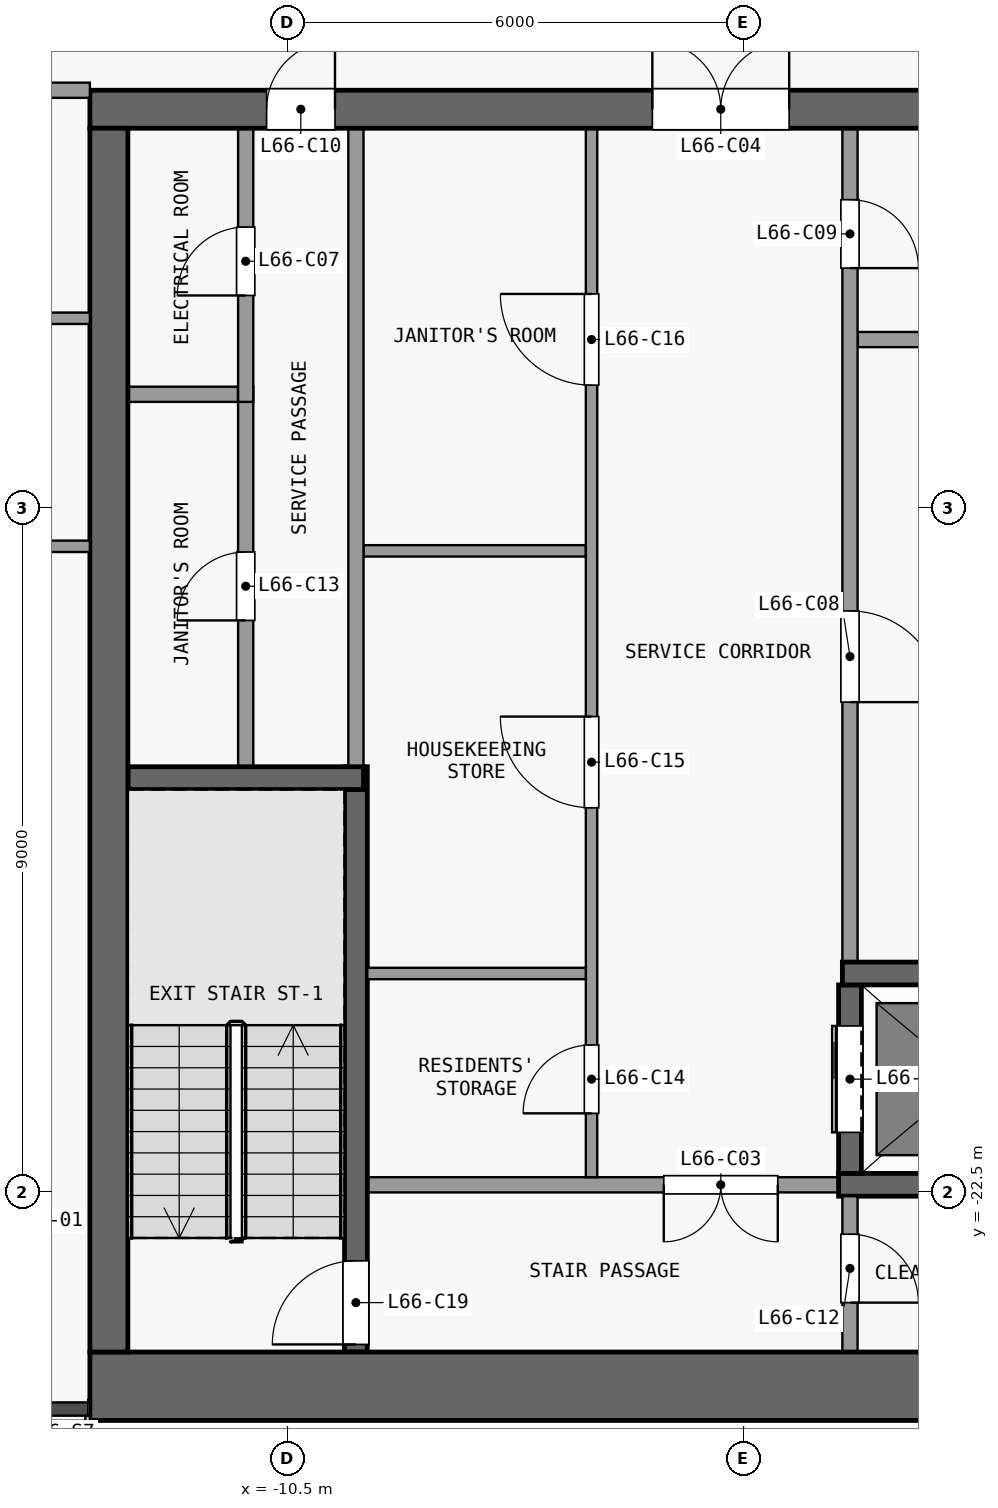
"""IFC4 building model, lengths in metres.
Left out: names, types, materials, properties, quantities, classifications, styles, units other than length and angle.
Written with IfcOpenShell. Run it as: python <this file> out.ifc"""

import sys

from ifc_helpers import new_model, si_unit, direction, frame, frame_2d, origin, place, context, subcontext, project, spatial, rectangle, extrude, element, fill, save


model = new_model("IFC4")
c1 = context("Model", 3, precision=1e-05, world=origin(), true_north=direction((0.0, 1.0)))
c2 = subcontext(c1, "Body", "Model", "MODEL_VIEW")
j1 = project(units=[si_unit("LENGTHUNIT", "METRE"), si_unit("PLANEANGLEUNIT", "RADIAN")], contexts=[c1])
p1 = place(None, origin())
s1 = spatial("IfcSite", under=j1, at=p1, CompositionType="ELEMENT")
p2 = place(p1, origin())
s2 = spatial("IfcBuilding", under=s1, at=p2, CompositionType="ELEMENT")
p3 = place(p2, frame((0.0, 0.0, 262.7)))
s3 = spatial("IfcBuildingStorey", under=s2, at=p3, CompositionType="ELEMENT", Elevation=262.7)
p4 = place(p3, frame((-13.1, -25.05, 0.0), z_axis=(0.0, 0.0, 1.0), x_axis=(1.0, 0.0, 0.0)))
e1 = element("IfcWall", 1, at=p4, inside=s3, PredefinedType="SHEAR", context=c2, shape_type="SweptSolid", body=[
    extrude(rectangle(XDim=26.2, YDim=0.9, at=frame_2d((13.1, 0.0))), origin(), (0.0, 0.0, 1.0), 3.3),
])
p5 = place(p3, frame((-13.1, -8.25, 0.0), z_axis=(0.0, 0.0, 1.0), x_axis=(1.0, 0.0, 0.0)))
e2 = element("IfcWall", 2, at=p5, inside=s3, PredefinedType="SHEAR", context=c2, shape_type="SweptSolid", body=[
    extrude(rectangle(XDim=26.2, YDim=0.5, at=frame_2d((13.1, 0.0))), origin(), (0.0, 0.0, 1.0), 3.3),
])
p6 = place(p5, frame((7.4, 0.0, 0.0)))
e3 = element("IfcOpeningElement", 3, at=p6, cuts=e2, PredefinedType="OPENING", context=c2, shape_type="SweptSolid", body=[
    extrude(rectangle(XDim=1.8, YDim=2.1, at=frame_2d((0.9, 1.05))), frame((0.0, 0.26, 0.0), z_axis=(0.0, -1.0, 0.0), x_axis=(1.0, 0.0, 0.0)), (0.0, 0.0, 1.0), 0.52),
])
p7 = place(p5, frame((17.0, 0.0, 0.0)))
e4 = element("IfcOpeningElement", 4, at=p7, cuts=e2, PredefinedType="OPENING", context=c2, shape_type="SweptSolid", body=[
    extrude(rectangle(XDim=1.8, YDim=2.1, at=frame_2d((0.9, 1.05))), frame((0.0, 0.26, 0.0), z_axis=(0.0, -1.0, 0.0), x_axis=(1.0, 0.0, 0.0)), (0.0, 0.0, 1.0), 0.52),
])
p8 = place(p5, frame((2.325, 0.0, 0.0)))
e5 = element("IfcOpeningElement", 5, at=p8, cuts=e2, PredefinedType="OPENING", context=c2, shape_type="SweptSolid", body=[
    extrude(rectangle(XDim=0.9, YDim=2.1, at=frame_2d((0.45, 1.05))), frame((0.0, 0.26, 0.0), z_axis=(0.0, -1.0, 0.0), x_axis=(1.0, 0.0, 0.0)), (0.0, 0.0, 1.0), 0.52),
])
p9 = place(p5, frame((23.675, 0.0, 0.0)))
e6 = element("IfcOpeningElement", 6, at=p9, cuts=e2, PredefinedType="OPENING", context=c2, shape_type="SweptSolid", body=[
    extrude(rectangle(XDim=1.2, YDim=2.1, at=frame_2d((0.6, 1.05))), frame((0.0, 0.26, 0.0), z_axis=(0.0, -1.0, 0.0), x_axis=(1.0, 0.0, 0.0)), (0.0, 0.0, 1.0), 0.52),
])
p10 = place(p3, frame((-12.85, -24.6, 0.0), z_axis=(0.0, 0.0, 1.0), x_axis=(0.0, 1.0, 0.0)))
e7 = element("IfcWall", 7, at=p10, inside=s3, PredefinedType="SHEAR", context=c2, shape_type="SweptSolid", body=[
    extrude(rectangle(XDim=16.1, YDim=0.5, at=frame_2d((8.05, 0.0))), origin(), (0.0, 0.0, 1.0), 3.3),
])
p11 = place(p3, frame((-3.25, -22.4, 0.0), z_axis=(0.0, 0.0, 1.0), x_axis=(-1.0, 0.0, 0.0)))
e8 = element("IfcWall", 8, at=p11, inside=s3, PredefinedType="PARTITIONING", context=c2, shape_type="SweptSolid", body=[
    extrude(rectangle(XDim=6.2, YDim=0.2, at=frame_2d((3.1, 0.0))), origin(), (0.0, 0.0, 1.0), 3.3),
])
p12 = place(p11, frame((0.8, 0.0, 0.0)))
e9 = element("IfcOpeningElement", 9, at=p12, cuts=e8, PredefinedType="OPENING", context=c2, shape_type="SweptSolid", body=[
    extrude(rectangle(XDim=1.5, YDim=2.1, at=frame_2d((0.75, 1.05))), frame((0.0, 0.11, 0.0), z_axis=(0.0, -1.0, 0.0), x_axis=(1.0, 0.0, 0.0)), (0.0, 0.0, 1.0), 0.22),
])
p13 = place(p3, frame((-3.25, -22.4, 0.0), z_axis=(0.0, 0.0, 1.0), x_axis=(1.0, 0.0, 0.0)))
e10 = element("IfcWall", 10, at=p13, inside=s3, PredefinedType="SHEAR", context=c2, shape_type="SweptSolid", body=[
    extrude(rectangle(XDim=6.5, YDim=0.3, at=frame_2d((3.25, 0.0))), origin(), (0.0, 0.0, 1.0), 3.3),
])
p14 = place(p3, frame((-9.45, -19.62, 0.0), z_axis=(0.0, 0.0, 1.0), x_axis=(1.0, 0.0, 0.0)))
e11 = element("IfcWall", 11, at=p14, inside=s3, PredefinedType="PARTITIONING", context=c2, shape_type="SweptSolid", body=[
    extrude(rectangle(XDim=2.875, YDim=0.15, at=frame_2d((1.438, 0.0))), origin(), (0.0, 0.0, 1.0), 3.3),
])
p15 = place(p3, frame((-3.2, -19.62, 0.0), z_axis=(0.0, 0.0, 1.0), x_axis=(1.0, 0.0, 0.0)))
e12 = element("IfcWall", 12, at=p15, inside=s3, PredefinedType="SHEAR", context=c2, shape_type="SweptSolid", body=[
    extrude(rectangle(XDim=3.05, YDim=0.3, at=frame_2d((1.525, 0.0))), origin(), (0.0, 0.0, 1.0), 3.3),
])
p16 = place(p3, frame((-12.6, -17.05, 0.0), z_axis=(0.0, 0.0, 1.0), x_axis=(1.0, 0.0, 0.0)))
e13 = element("IfcWall", 13, at=p16, inside=s3, PredefinedType="SHEAR", context=c2, shape_type="SweptSolid", body=[
    extrude(rectangle(XDim=3.1, YDim=0.3, at=frame_2d((1.55, 0.0))), origin(), (0.0, 0.0, 1.0), 3.3),
])
p17 = place(p3, frame((-9.5, -14.06, 0.0), z_axis=(0.0, 0.0, 1.0), x_axis=(1.0, 0.0, 0.0)))
e14 = element("IfcWall", 14, at=p17, inside=s3, PredefinedType="PARTITIONING", context=c2, shape_type="SweptSolid", body=[
    extrude(rectangle(XDim=2.925, YDim=0.15, at=frame_2d((1.462, 0.0))), origin(), (0.0, 0.0, 1.0), 3.3),
])
p18 = place(p3, frame((-12.6, -12.0, 0.0), z_axis=(0.0, 0.0, 1.0), x_axis=(1.0, 0.0, 0.0)))
e15 = element("IfcWall", 15, at=p18, inside=s3, PredefinedType="PARTITIONING", context=c2, shape_type="SweptSolid", body=[
    extrude(rectangle(XDim=1.45, YDim=0.2, at=frame_2d((0.725, 0.0))), origin(), (0.0, 0.0, 1.0), 3.3),
])
p19 = place(p3, frame((-3.0, -11.28, 0.0), z_axis=(0.0, 0.0, 1.0), x_axis=(1.0, 0.0, 0.0)))
e16 = element("IfcWall", 16, at=p19, inside=s3, PredefinedType="PARTITIONING", context=c2, shape_type="SweptSolid", body=[
    extrude(rectangle(XDim=2.9, YDim=0.2, at=frame_2d((1.45, 0.0))), origin(), (0.0, 0.0, 1.0), 3.3),
])
p20 = place(p3, frame((-11.05, -16.9, 0.0), z_axis=(0.0, 0.0, 1.0), x_axis=(0.0, 1.0, 0.0)))
e17 = element("IfcWall", 17, at=p20, inside=s3, PredefinedType="PARTITIONING", context=c2, shape_type="SweptSolid", body=[
    extrude(rectangle(XDim=5.0, YDim=0.2, at=frame_2d((2.5, 0.0))), origin(), (0.0, 0.0, 1.0), 3.3),
])
p21 = place(p20, frame((1.925, 0.0, 0.0)))
e18 = element("IfcOpeningElement", 18, at=p21, cuts=e17, PredefinedType="OPENING", context=c2, shape_type="SweptSolid", body=[
    extrude(rectangle(XDim=0.9, YDim=2.1, at=frame_2d((0.45, 1.05))), frame((0.0, 0.11, 0.0), z_axis=(0.0, -1.0, 0.0), x_axis=(1.0, 0.0, 0.0)), (0.0, 0.0, 1.0), 0.22),
])
p22 = place(p3, frame((-11.05, -12.1, 0.0), z_axis=(0.0, 0.0, 1.0), x_axis=(0.0, 1.0, 0.0)))
e19 = element("IfcWall", 19, at=p22, inside=s3, PredefinedType="PARTITIONING", context=c2, shape_type="SweptSolid", body=[
    extrude(rectangle(XDim=3.6, YDim=0.2, at=frame_2d((1.8, 0.0))), origin(), (0.0, 0.0, 1.0), 3.3),
])
p23 = place(p22, frame((1.4, 0.0, 0.0)))
e20 = element("IfcOpeningElement", 20, at=p23, cuts=e19, PredefinedType="OPENING", context=c2, shape_type="SweptSolid", body=[
    extrude(rectangle(XDim=0.9, YDim=2.1, at=frame_2d((0.45, 1.05))), frame((0.0, 0.11, 0.0), z_axis=(0.0, -1.0, 0.0), x_axis=(1.0, 0.0, 0.0)), (0.0, 0.0, 1.0), 0.22),
])
p24 = place(p3, frame((-9.6, -24.6, 0.0), z_axis=(0.0, 0.0, 1.0), x_axis=(0.0, 1.0, 0.0)))
e21 = element("IfcWall", 21, at=p24, inside=s3, PredefinedType="SHEAR", context=c2, shape_type="SweptSolid", body=[
    extrude(rectangle(XDim=7.7, YDim=0.3, at=frame_2d((3.85, 0.0))), origin(), (0.0, 0.0, 1.0), 3.3),
])
p25 = place(p24, frame((0.1, 0.0, 0.0)))
e22 = element("IfcOpeningElement", 22, at=p25, cuts=e21, PredefinedType="OPENING", context=c2, shape_type="SweptSolid", body=[
    extrude(rectangle(XDim=1.1, YDim=2.1, at=frame_2d((0.55, 1.05))), frame((0.0, 0.16, 0.0), z_axis=(0.0, -1.0, 0.0), x_axis=(1.0, 0.0, 0.0)), (0.0, 0.0, 1.0), 0.32),
])
p26 = place(p3, frame((-9.6, -16.9, 0.0), z_axis=(0.0, 0.0, 1.0), x_axis=(0.0, 1.0, 0.0)))
e23 = element("IfcWall", 23, at=p26, inside=s3, PredefinedType="PARTITIONING", context=c2, shape_type="SweptSolid", body=[
    extrude(rectangle(XDim=8.4, YDim=0.2, at=frame_2d((4.2, 0.0))), origin(), (0.0, 0.0, 1.0), 3.3),
])
p27 = place(p3, frame((-6.5, -22.3, 0.0), z_axis=(0.0, 0.0, 1.0), x_axis=(0.0, 1.0, 0.0)))
e24 = element("IfcWall", 24, at=p27, inside=s3, PredefinedType="PARTITIONING", context=c2, shape_type="SweptSolid", body=[
    extrude(rectangle(XDim=13.8, YDim=0.15, at=frame_2d((6.9, 0.0))), origin(), (0.0, 0.0, 1.0), 3.3),
])
p28 = place(p27, frame((0.84, 0.0, 0.0)))
e25 = element("IfcOpeningElement", 25, at=p28, cuts=e24, PredefinedType="OPENING", context=c2, shape_type="SweptSolid", body=[
    extrude(rectangle(XDim=0.9, YDim=2.1, at=frame_2d((0.45, 1.05))), frame((0.0, 0.085, 0.0), z_axis=(0.0, -1.0, 0.0), x_axis=(1.0, 0.0, 0.0)), (0.0, 0.0, 1.0), 0.17),
])
p29 = place(p27, frame((4.86, 0.0, 0.0)))
e26 = element("IfcOpeningElement", 26, at=p29, cuts=e24, PredefinedType="OPENING", context=c2, shape_type="SweptSolid", body=[
    extrude(rectangle(XDim=1.2, YDim=2.1, at=frame_2d((0.6, 1.05))), frame((0.0, 0.085, 0.0), z_axis=(0.0, -1.0, 0.0), x_axis=(1.0, 0.0, 0.0)), (0.0, 0.0, 1.0), 0.17),
])
p30 = place(p27, frame((10.42, 0.0, 0.0)))
e27 = element("IfcOpeningElement", 27, at=p30, cuts=e24, PredefinedType="OPENING", context=c2, shape_type="SweptSolid", body=[
    extrude(rectangle(XDim=1.2, YDim=2.1, at=frame_2d((0.6, 1.05))), frame((0.0, 0.085, 0.0), z_axis=(0.0, -1.0, 0.0), x_axis=(1.0, 0.0, 0.0)), (0.0, 0.0, 1.0), 0.17),
])
p31 = place(p3, frame((-3.1, -22.55, 0.0), z_axis=(0.0, 0.0, 1.0), x_axis=(0.0, -1.0, 0.0)))
e28 = element("IfcWall", 28, at=p31, inside=s3, PredefinedType="PARTITIONING", context=c2, shape_type="SweptSolid", body=[
    extrude(rectangle(XDim=2.05, YDim=0.2, at=frame_2d((1.025, 0.0))), origin(), (0.0, 0.0, 1.0), 3.3),
])
p32 = place(p31, frame((0.5, 0.0, 0.0)))
e29 = element("IfcOpeningElement", 29, at=p32, cuts=e28, PredefinedType="OPENING", context=c2, shape_type="SweptSolid", body=[
    extrude(rectangle(XDim=0.9, YDim=2.1, at=frame_2d((0.45, 1.05))), frame((0.0, 0.11, 0.0), z_axis=(0.0, -1.0, 0.0), x_axis=(1.0, 0.0, 0.0)), (0.0, 0.0, 1.0), 0.22),
])
p33 = place(p3, frame((-3.1, -22.25, 0.0), z_axis=(0.0, 0.0, 1.0), x_axis=(0.0, 1.0, 0.0)))
e30 = element("IfcWall", 30, at=p33, inside=s3, PredefinedType="SHEAR", context=c2, shape_type="SweptSolid", body=[
    extrude(rectangle(XDim=2.48, YDim=0.3, at=frame_2d((1.24, 0.0))), origin(), (0.0, 0.0, 1.0), 3.3),
])
p34 = place(p33, frame((0.54, 0.0, 0.0)))
e31 = element("IfcOpeningElement", 31, at=p34, cuts=e30, PredefinedType="OPENING", context=c2, shape_type="SweptSolid", body=[
    extrude(rectangle(XDim=1.4, YDim=2.1, at=frame_2d((0.7, 1.05))), frame((0.0, 0.16, 0.0), z_axis=(0.0, -1.0, 0.0), x_axis=(1.0, 0.0, 0.0)), (0.0, 0.0, 1.0), 0.32),
])
p35 = place(p3, frame((-3.1, -8.5, 0.0), z_axis=(0.0, 0.0, 1.0), x_axis=(0.0, -1.0, 0.0)))
e32 = element("IfcWall", 32, at=p35, inside=s3, PredefinedType="PARTITIONING", context=c2, shape_type="SweptSolid", body=[
    extrude(rectangle(XDim=10.97, YDim=0.2, at=frame_2d((5.485, 0.0))), origin(), (0.0, 0.0, 1.0), 3.3),
])
p36 = place(p35, frame((6.35, 0.0, 0.0)))
e33 = element("IfcOpeningElement", 33, at=p36, cuts=e32, PredefinedType="OPENING", context=c2, shape_type="SweptSolid", body=[
    extrude(rectangle(XDim=1.2, YDim=2.1, at=frame_2d((0.6, 1.05))), frame((0.0, 0.11, 0.0), z_axis=(0.0, -1.0, 0.0), x_axis=(1.0, 0.0, 0.0)), (0.0, 0.0, 1.0), 0.22),
])
p37 = place(p35, frame((0.94, 0.0, 0.0)))
e34 = element("IfcOpeningElement", 34, at=p37, cuts=e32, PredefinedType="OPENING", context=c2, shape_type="SweptSolid", body=[
    extrude(rectangle(XDim=0.9, YDim=2.1, at=frame_2d((0.45, 1.05))), frame((0.0, 0.11, 0.0), z_axis=(0.0, -1.0, 0.0), x_axis=(1.0, 0.0, 0.0)), (0.0, 0.0, 1.0), 0.22),
])
p38 = place(p3, frame((-19.262, -14.0, 0.0), z_axis=(0.0, 0.0, 1.0), x_axis=(1.0, 0.0, 0.0)))
e35 = element("IfcWall", 35, at=p38, inside=s3, PredefinedType="PARTITIONING", context=c2, shape_type="SweptSolid", body=[
    extrude(rectangle(XDim=6.162, YDim=0.15, at=frame_2d((3.081, 0.0))), origin(), (0.0, 0.0, 1.0), 3.3),
])
p39 = place(p38, frame((0.812, 0.0, 0.0)))
e36 = element("IfcOpeningElement", 36, at=p39, cuts=e35, PredefinedType="OPENING", context=c2, shape_type="SweptSolid", body=[
    extrude(rectangle(XDim=0.9, YDim=2.1, at=frame_2d((0.45, 1.05))), frame((0.0, 0.085, 0.0), z_axis=(0.0, -1.0, 0.0), x_axis=(1.0, 0.0, 0.0)), (0.0, 0.0, 1.0), 0.17),
])
p40 = place(p3, frame((-19.262, -11.0, 0.0), z_axis=(0.0, 0.0, 1.0), x_axis=(1.0, 0.0, 0.0)))
e37 = element("IfcWall", 37, at=p40, inside=s3, PredefinedType="PARTITIONING", context=c2, shape_type="SweptSolid", body=[
    extrude(rectangle(XDim=6.162, YDim=0.15, at=frame_2d((3.081, 0.0))), origin(), (0.0, 0.0, 1.0), 3.3),
])
p41 = place(p40, frame((1.113, 0.0, 0.0)))
e38 = element("IfcOpeningElement", 38, at=p41, cuts=e37, PredefinedType="OPENING", context=c2, shape_type="SweptSolid", body=[
    extrude(rectangle(XDim=0.9, YDim=2.1, at=frame_2d((0.45, 1.05))), frame((0.0, 0.085, 0.0), z_axis=(0.0, -1.0, 0.0), x_axis=(1.0, 0.0, 0.0)), (0.0, 0.0, 1.0), 0.17),
])
p42 = place(p40, frame((4.162, 0.0, 0.0)))
e39 = element("IfcOpeningElement", 39, at=p42, cuts=e37, PredefinedType="OPENING", context=c2, shape_type="SweptSolid", body=[
    extrude(rectangle(XDim=0.9, YDim=2.1, at=frame_2d((0.45, 1.05))), frame((0.0, 0.085, 0.0), z_axis=(0.0, -1.0, 0.0), x_axis=(1.0, 0.0, 0.0)), (0.0, 0.0, 1.0), 0.17),
])
p43 = place(p3, frame((-19.262, -8.0, 0.0), z_axis=(0.0, 0.0, 1.0), x_axis=(1.0, 0.0, 0.0)))
e40 = element("IfcWall", 40, at=p43, inside=s3, PredefinedType="PARTITIONING", context=c2, shape_type="SweptSolid", body=[
    extrude(rectangle(XDim=6.162, YDim=0.2, at=frame_2d((3.081, 0.0))), origin(), (0.0, 0.0, 1.0), 3.3),
])
p44 = place(p43, frame((2.512, 0.0, 0.0)))
e41 = element("IfcOpeningElement", 41, at=p44, cuts=e40, PredefinedType="OPENING", context=c2, shape_type="SweptSolid", body=[
    extrude(rectangle(XDim=1.0, YDim=2.1, at=frame_2d((0.5, 1.05))), frame((0.0, 0.11, 0.0), z_axis=(0.0, -1.0, 0.0), x_axis=(1.0, 0.0, 0.0)), (0.0, 0.0, 1.0), 0.22),
])
p45 = place(p34, origin())
e42 = element("IfcDoor", 42, at=p45, inside=s3, OperationType="DOUBLE_DOOR_SLIDING", PredefinedType="DOOR", context=c2, shape_type="SweptSolid", body=[
    extrude(rectangle(XDim=1.4, YDim=2.1, at=frame_2d((0.7, 1.05))), frame((0.0, 0.025, 0.0), z_axis=(0.0, -1.0, 0.0), x_axis=(1.0, 0.0, 0.0)), (0.0, 0.0, 1.0), 0.05),
])
fill(e31, e42)
p46 = place(p12, origin())
e43 = element("IfcDoor", 43, at=p46, inside=s3, OperationType="DOUBLE_DOOR_SINGLE_SWING", PredefinedType="DOOR", context=c2, shape_type="SweptSolid", body=[
    extrude(rectangle(XDim=1.5, YDim=2.1, at=frame_2d((0.75, 1.05))), frame((0.0, 0.025, 0.0), z_axis=(0.0, -1.0, 0.0), x_axis=(1.0, 0.0, 0.0)), (0.0, 0.0, 1.0), 0.05),
])
fill(e9, e43)
p47 = place(p6, origin())
e44 = element("IfcDoor", 44, at=p47, inside=s3, OperationType="DOUBLE_DOOR_SINGLE_SWING", PredefinedType="DOOR", context=c2, shape_type="SweptSolid", body=[
    extrude(rectangle(XDim=1.8, YDim=2.1, at=frame_2d((0.9, 1.05))), frame((0.0, 0.025, 0.0), z_axis=(0.0, -1.0, 0.0), x_axis=(1.0, 0.0, 0.0)), (0.0, 0.0, 1.0), 0.05),
])
fill(e3, e44)
p48 = place(p23, origin())
e45 = element("IfcDoor", 45, at=p48, inside=s3, OperationType="SINGLE_SWING_LEFT", PredefinedType="DOOR", context=c2, shape_type="SweptSolid", body=[
    extrude(rectangle(XDim=0.9, YDim=2.1, at=frame_2d((0.45, 1.05))), frame((0.0, 0.025, 0.0), z_axis=(0.0, -1.0, 0.0), x_axis=(1.0, 0.0, 0.0)), (0.0, 0.0, 1.0), 0.05),
])
fill(e20, e45)
p49 = place(p36, origin())
e46 = element("IfcDoor", 46, at=p49, inside=s3, OperationType="SINGLE_SWING_RIGHT", PredefinedType="DOOR", context=c2, shape_type="SweptSolid", body=[
    extrude(rectangle(XDim=1.2, YDim=2.1, at=frame_2d((0.6, 1.05))), frame((0.0, 0.025, 0.0), z_axis=(0.0, -1.0, 0.0), x_axis=(1.0, 0.0, 0.0)), (0.0, 0.0, 1.0), 0.05),
])
fill(e33, e46)
p50 = place(p37, origin())
e47 = element("IfcDoor", 47, at=p50, inside=s3, OperationType="SINGLE_SWING_RIGHT", PredefinedType="DOOR", context=c2, shape_type="SweptSolid", body=[
    extrude(rectangle(XDim=0.9, YDim=2.1, at=frame_2d((0.45, 1.05))), frame((0.0, 0.025, 0.0), z_axis=(0.0, -1.0, 0.0), x_axis=(1.0, 0.0, 0.0)), (0.0, 0.0, 1.0), 0.05),
])
fill(e34, e47)
p51 = place(p8, origin())
e48 = element("IfcDoor", 48, at=p51, inside=s3, OperationType="SINGLE_SWING_RIGHT", PredefinedType="DOOR", context=c2, shape_type="SweptSolid", body=[
    extrude(rectangle(XDim=0.9, YDim=2.1, at=frame_2d((0.45, 1.05))), frame((0.0, 0.025, 0.0), z_axis=(0.0, -1.0, 0.0), x_axis=(1.0, 0.0, 0.0)), (0.0, 0.0, 1.0), 0.05),
])
fill(e5, e48)
p52 = place(p32, origin())
e49 = element("IfcDoor", 49, at=p52, inside=s3, OperationType="SINGLE_SWING_RIGHT", PredefinedType="DOOR", context=c2, shape_type="SweptSolid", body=[
    extrude(rectangle(XDim=0.9, YDim=2.1, at=frame_2d((0.45, 1.05))), frame((0.0, 0.025, 0.0), z_axis=(0.0, -1.0, 0.0), x_axis=(1.0, 0.0, 0.0)), (0.0, 0.0, 1.0), 0.05),
])
fill(e29, e49)
p53 = place(p21, origin())
e50 = element("IfcDoor", 50, at=p53, inside=s3, OperationType="SINGLE_SWING_LEFT", PredefinedType="DOOR", context=c2, shape_type="SweptSolid", body=[
    extrude(rectangle(XDim=0.9, YDim=2.1, at=frame_2d((0.45, 1.05))), frame((0.0, 0.025, 0.0), z_axis=(0.0, -1.0, 0.0), x_axis=(1.0, 0.0, 0.0)), (0.0, 0.0, 1.0), 0.05),
])
fill(e18, e50)
p54 = place(p28, origin())
e51 = element("IfcDoor", 51, at=p54, inside=s3, OperationType="SINGLE_SWING_LEFT", PredefinedType="DOOR", context=c2, shape_type="SweptSolid", body=[
    extrude(rectangle(XDim=0.9, YDim=2.1, at=frame_2d((0.45, 1.05))), frame((0.0, 0.025, 0.0), z_axis=(0.0, -1.0, 0.0), x_axis=(1.0, 0.0, 0.0)), (0.0, 0.0, 1.0), 0.05),
])
fill(e25, e51)
p55 = place(p29, origin())
e52 = element("IfcDoor", 52, at=p55, inside=s3, OperationType="SINGLE_SWING_RIGHT", PredefinedType="DOOR", context=c2, shape_type="SweptSolid", body=[
    extrude(rectangle(XDim=1.2, YDim=2.1, at=frame_2d((0.6, 1.05))), frame((0.0, 0.025, 0.0), z_axis=(0.0, -1.0, 0.0), x_axis=(1.0, 0.0, 0.0)), (0.0, 0.0, 1.0), 0.05),
])
fill(e26, e52)
p56 = place(p30, origin())
e53 = element("IfcDoor", 53, at=p56, inside=s3, OperationType="SINGLE_SWING_RIGHT", PredefinedType="DOOR", context=c2, shape_type="SweptSolid", body=[
    extrude(rectangle(XDim=1.2, YDim=2.1, at=frame_2d((0.6, 1.05))), frame((0.0, 0.025, 0.0), z_axis=(0.0, -1.0, 0.0), x_axis=(1.0, 0.0, 0.0)), (0.0, 0.0, 1.0), 0.05),
])
fill(e27, e53)
p57 = place(p25, origin())
e54 = element("IfcDoor", 54, at=p57, inside=s3, OperationType="SINGLE_SWING_LEFT", PredefinedType="DOOR", context=c2, shape_type="SweptSolid", body=[
    extrude(rectangle(XDim=1.1, YDim=2.1, at=frame_2d((0.55, 1.05))), frame((0.0, 0.025, 0.0), z_axis=(0.0, -1.0, 0.0), x_axis=(1.0, 0.0, 0.0)), (0.0, 0.0, 1.0), 0.05),
])
fill(e22, e54)
save(model, sys.argv[1])
